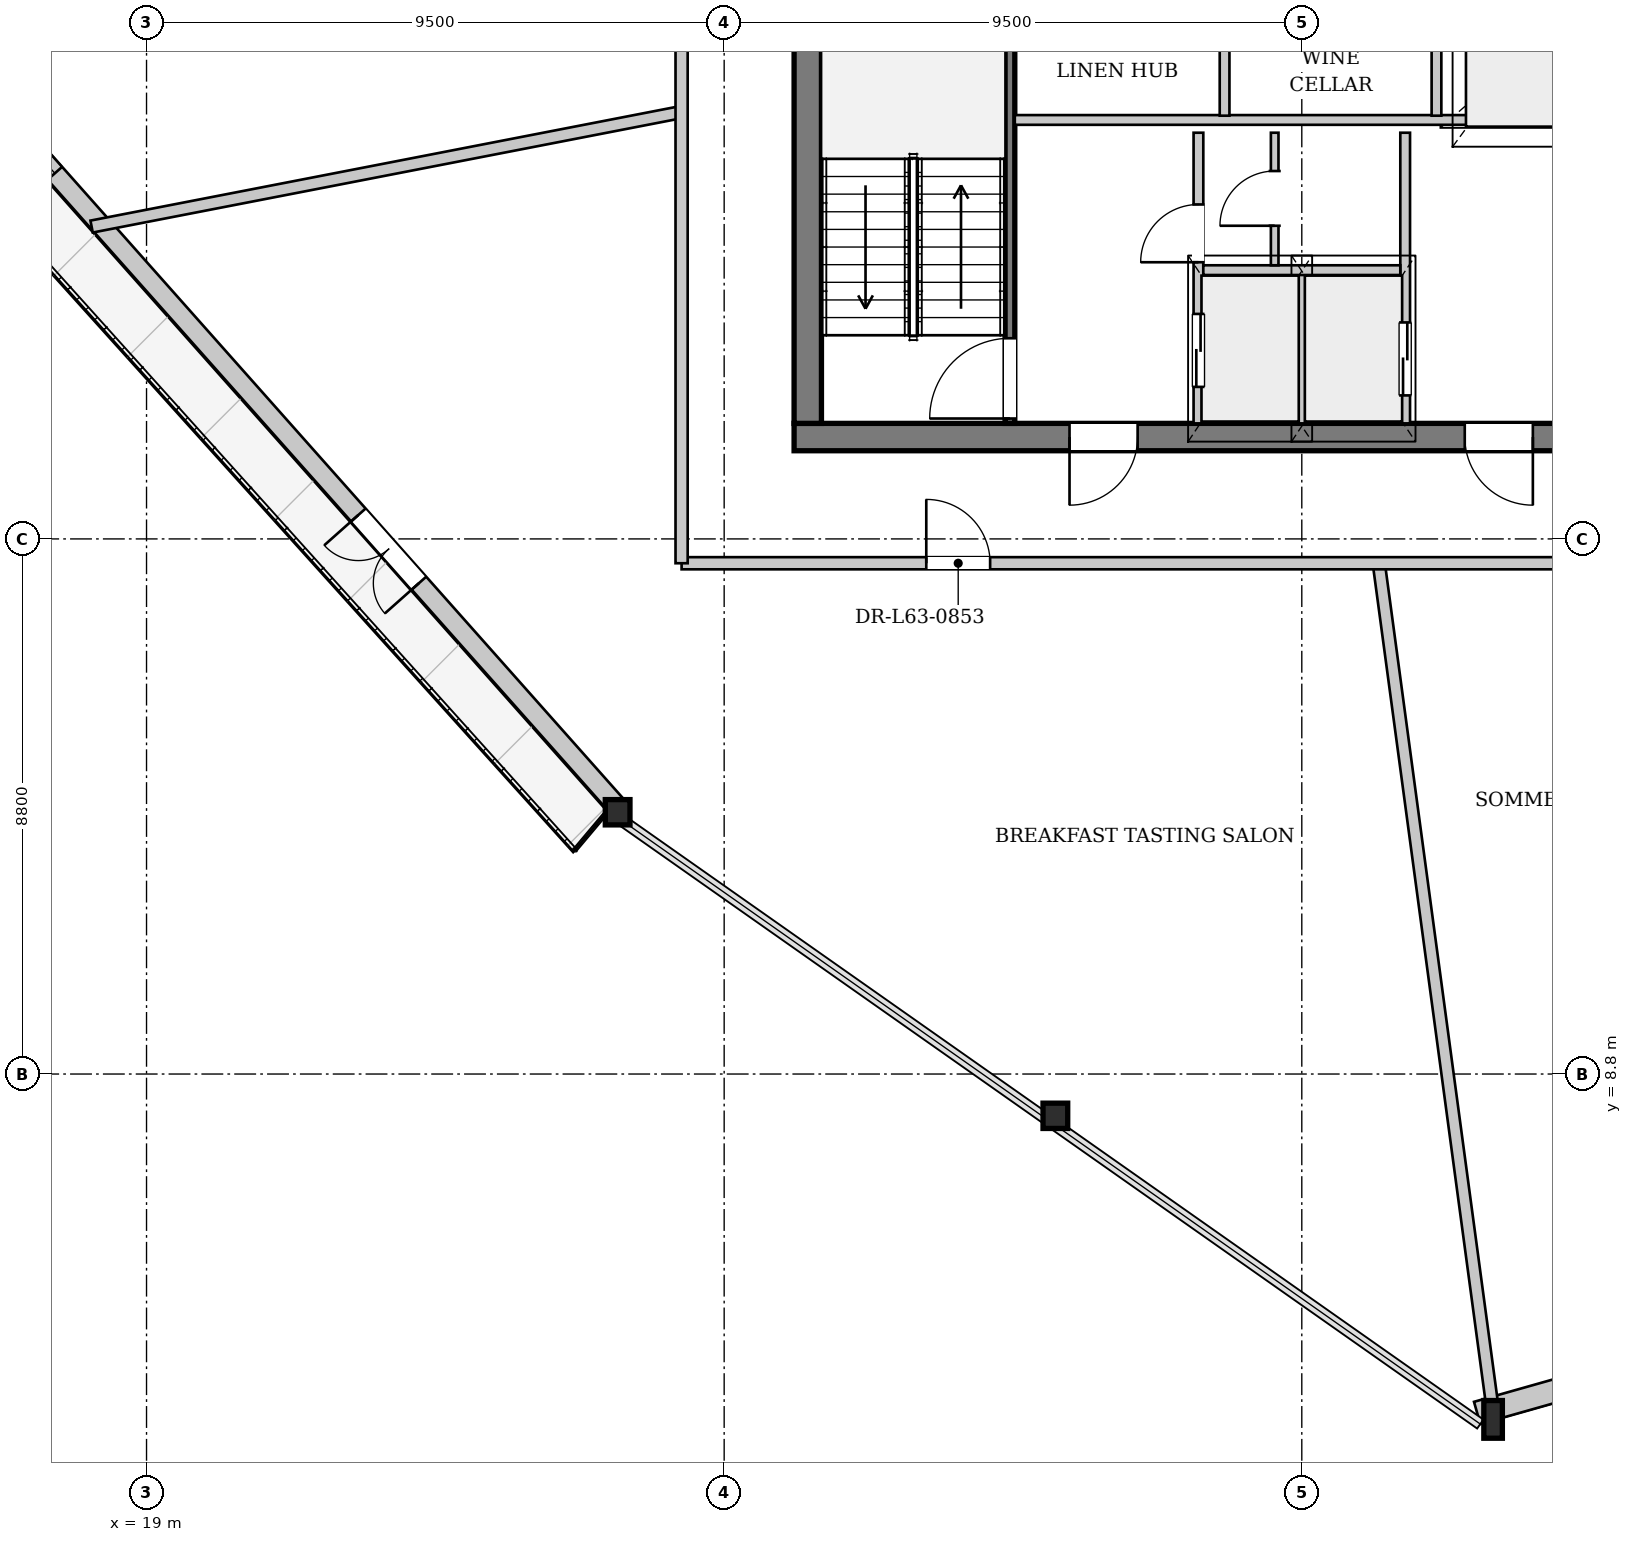
"""IFC4 building model, lengths in metres.
Left out: names, types, materials, properties, quantities, classifications, styles, units other than length and angle.
Written with IfcOpenShell. Run it as: python <this file> out.ifc"""

import sys

from ifc_helpers import new_model, si_unit, direction, frame, frame_2d, origin, origin_2d, place, context, subcontext, project, spatial, rectangle, i_section, extrude, source, transform, mapped, element, fill, save


model = new_model("IFC4")
c1 = context("Model", 3, precision=1e-05, world=origin(), true_north=direction((0.0, 1.0)))
c2 = subcontext(c1, "Body", "Model", "MODEL_VIEW")
j1 = project(units=[si_unit("LENGTHUNIT", "METRE"), si_unit("PLANEANGLEUNIT", "RADIAN")], contexts=[c1])
p1 = place(None, origin())
s1 = spatial("IfcSite", under=j1, at=p1, CompositionType="ELEMENT")
p2 = place(p1, origin())
s2 = spatial("IfcBuilding", under=s1, at=p2, CompositionType="ELEMENT")
p3 = place(p2, frame((0.0, 0.0, 238.1)))
s3 = spatial("IfcBuildingStorey", under=s2, at=p3, CompositionType="ELEMENT", Elevation=238.1)
m1 = source(origin(), c2, "Body", "SweptSolid", [
    extrude(i_section(OverallWidth=0.406, OverallDepth=0.416, WebThickness=0.027, FlangeThickness=0.042, at=origin_2d()), origin(), (0.0, 0.0, 1.0), 3.45),
])
p4 = place(p3, frame((26.589, 13.131, 0.0), z_axis=(0.091929151613, -0.015073833174, 0.995651450377), x_axis=(0.161811410383, 0.986821699939, 0.0)))
e1 = element("IfcColumn", 1, at=p4, inside=s3, PredefinedType="COLUMN", context=c2, shape_type="MappedRepresentation", body=[
    mapped(m1, transform((0.0, 0.0, 0.0), x_axis=(1.0, 0.0, 0.0), y_axis=(0.0, 1.0, 0.0), z_axis=(0.0, 0.0, 1.0), scale=1.0)),
])
m2 = source(origin(), c2, "Body", "SweptSolid", [
    extrude(i_section(OverallWidth=0.406, OverallDepth=0.416, WebThickness=0.027, FlangeThickness=0.042, at=origin_2d()), origin(), (0.0, 0.0, 1.0), 3.455),
])
p5 = place(p3, frame((33.762, 8.087, 0.0), z_axis=(0.106843472903, 0.014698043891, 0.994167209177), x_axis=(-0.136282644933, 0.990669995856, 0.0)))
e2 = element("IfcColumn", 2, at=p5, inside=s3, PredefinedType="COLUMN", context=c2, shape_type="MappedRepresentation", body=[
    mapped(m2, transform((0.0, 0.0, 0.0), x_axis=(1.0, 0.0, 0.0), y_axis=(0.0, 1.0, 0.0), z_axis=(0.0, 0.0, 1.0), scale=1.0)),
])
m3 = source(origin(), c2, "Body", "SweptSolid", [
    extrude(i_section(OverallWidth=0.305, OverallDepth=0.62, WebThickness=0.021, FlangeThickness=0.04, at=origin_2d()), origin(), (0.0, 0.0, 1.0), 3.464),
])
p6 = place(p3, frame((40.936, 3.044, 0.0), z_axis=(0.121578996156, 0.044332283236, 0.991591244595), x_axis=(-0.342573792128, 0.939490924356, 0.0)))
e3 = element("IfcColumn", 3, at=p6, inside=s3, PredefinedType="COLUMN", context=c2, shape_type="MappedRepresentation", body=[
    mapped(m3, transform((0.0, 0.0, 0.0), x_axis=(1.0, 0.0, 0.0), y_axis=(0.0, 1.0, 0.0), z_axis=(0.0, 0.0, 1.0), scale=1.0)),
])
p7 = place(p3, frame((44.15, 4.151, 0.0), z_axis=(0.0, 0.0, 1.0), x_axis=(-0.962229156425, -0.272240795117, 0.0)))
e4 = element("IfcWall", 4, at=p7, inside=s3, PredefinedType="SOLIDWALL", context=c2, shape_type="SweptSolid", body=[
    extrude(rectangle(XDim=3.394, YDim=0.38, at=frame_2d((1.697, 0.0))), origin(), (0.0, 0.0, 1.0), 2.872),
])
p8 = place(p3, frame((26.709, 13.237, 0.0), z_axis=(0.0, 0.0, 1.0), x_axis=(-0.664123592236, 0.74762280211, 0.0)))
e5 = element("IfcWall", 5, at=p8, inside=s3, PredefinedType="SOLIDWALL", context=c2, shape_type="SweptSolid", body=[
    extrude(rectangle(XDim=17.537, YDim=0.32, at=frame_2d((8.769, 0.0))), origin(), (0.0, 0.0, 1.0), 2.872),
])
p9 = place(p8, frame((4.862, 0.0, 0.0)))
e6 = element("IfcOpeningElement", 6, at=p9, cuts=e5, PredefinedType="OPENING", context=c2, shape_type="SweptSolid", body=[
    extrude(rectangle(XDim=1.5, YDim=2.3, at=frame_2d((0.75, 1.15))), frame((0.0, 0.17, 0.0), z_axis=(0.0, -1.0, 0.0), x_axis=(1.0, 0.0, 0.0)), (0.0, 0.0, 1.0), 0.34),
])
p10 = place(p8, frame((13.878, 0.0, 0.402)))
e7 = element("IfcOpeningElement", 7, at=p10, cuts=e5, PredefinedType="OPENING", context=c2, shape_type="SweptSolid", body=[
    extrude(rectangle(XDim=2.6, YDim=2.35, at=frame_2d((1.3, 1.175))), frame((0.0, 0.17, 0.0), z_axis=(0.0, -1.0, 0.0), x_axis=(1.0, 0.0, 0.0)), (0.0, 0.0, 1.0), 0.34),
])
p11 = place(p3, frame((46.35, 19.275, 0.0), z_axis=(0.0, 0.0, 1.0), x_axis=(-1.0, 0.0, 0.0)))
e8 = element("IfcWall", 8, at=p11, inside=s3, PredefinedType="SHEAR", context=c2, shape_type="SweptSolid", body=[
    extrude(rectangle(XDim=16.7, YDim=0.45, at=frame_2d((8.35, 0.0))), origin(), (0.0, 0.0, 1.0), 3.38),
])
p12 = place(p11, frame((4.55, 0.0, 0.0)))
e9 = element("IfcOpeningElement", 9, at=p12, cuts=e8, PredefinedType="OPENING", context=c2, shape_type="SweptSolid", body=[
    extrude(rectangle(XDim=1.12, YDim=2.25, at=frame_2d((0.56, 1.125))), frame((0.0, 0.235, 0.0), z_axis=(0.0, -1.0, 0.0), x_axis=(1.0, 0.0, 0.0)), (0.0, 0.0, 1.0), 0.47),
])
p13 = place(p11, frame((11.05, 0.0, 0.0)))
e10 = element("IfcOpeningElement", 10, at=p13, cuts=e8, PredefinedType="OPENING", context=c2, shape_type="SweptSolid", body=[
    extrude(rectangle(XDim=1.12, YDim=2.25, at=frame_2d((0.56, 1.125))), frame((0.0, 0.235, 0.0), z_axis=(0.0, -1.0, 0.0), x_axis=(1.0, 0.0, 0.0)), (0.0, 0.0, 1.0), 0.47),
])
p14 = place(p3, frame((29.875, 19.5, 0.0), z_axis=(0.0, 0.0, 1.0), x_axis=(0.0, 1.0, 0.0)))
e11 = element("IfcWall", 11, at=p14, inside=s3, PredefinedType="SHEAR", context=c2, shape_type="SweptSolid", body=[
    extrude(rectangle(XDim=14.2, YDim=0.45, at=frame_2d((7.1, 0.0))), origin(), (0.0, 0.0, 1.0), 3.38),
])
p15 = place(p14, frame((7.42, 0.0, 0.0)))
e12 = element("IfcOpeningElement", 12, at=p15, cuts=e11, PredefinedType="OPENING", context=c2, shape_type="SweptSolid", body=[
    extrude(rectangle(XDim=1.6, YDim=2.2, at=frame_2d((0.8, 1.1))), frame((0.0, 0.235, 0.0), z_axis=(0.0, -1.0, 0.0), x_axis=(1.0, 0.0, 0.0)), (0.0, 0.0, 1.0), 0.47),
])
p16 = place(p3, frame((33.2, 19.5, 0.0), z_axis=(0.0, 0.0, 1.0), x_axis=(0.0, 1.0, 0.0)))
e13 = element("IfcWall", 13, at=p16, inside=s3, PredefinedType="PARTITIONING", context=c2, shape_type="SweptSolid", body=[
    extrude(rectangle(XDim=7.46, YDim=0.16, at=frame_2d((3.73, 0.0))), origin(), (0.0, 0.0, 1.0), 3.38),
])
p17 = place(p16, frame((0.08, 0.0, 0.0)))
e14 = element("IfcOpeningElement", 14, at=p17, cuts=e13, PredefinedType="OPENING", context=c2, shape_type="SweptSolid", body=[
    extrude(rectangle(XDim=1.32, YDim=2.2, at=frame_2d((0.66, 1.1))), frame((0.0, 0.09, 0.0), z_axis=(0.0, -1.0, 0.0), x_axis=(1.0, 0.0, 0.0)), (0.0, 0.0, 1.0), 0.18),
])
p18 = place(p3, frame((36.3, 19.5, 0.0), z_axis=(0.0, 0.0, 1.0), x_axis=(0.0, 1.0, 0.0)))
e15 = element("IfcWall", 15, at=p18, inside=s3, PredefinedType="PARTITIONING", context=c2, shape_type="SweptSolid", body=[
    extrude(rectangle(XDim=4.78, YDim=0.16, at=frame_2d((2.39, 0.0))), origin(), (0.0, 0.0, 1.0), 3.38),
])
p19 = place(p18, frame((0.6, 0.0, 0.0)))
e16 = element("IfcOpeningElement", 16, at=p19, cuts=e15, PredefinedType="OPENING", context=c2, shape_type="SweptSolid", body=[
    extrude(rectangle(XDim=1.2, YDim=2.2, at=frame_2d((0.6, 1.1))), frame((0.0, 0.09, 0.0), z_axis=(0.0, -1.0, 0.0), x_axis=(1.0, 0.0, 0.0)), (0.0, 0.0, 1.0), 0.18),
])
p20 = place(p18, frame((2.65, 0.0, 0.0)))
e17 = element("IfcOpeningElement", 17, at=p20, cuts=e15, PredefinedType="OPENING", context=c2, shape_type="SweptSolid", body=[
    extrude(rectangle(XDim=0.95, YDim=2.1, at=frame_2d((0.475, 1.05))), frame((0.0, 0.09, 0.0), z_axis=(0.0, -1.0, 0.0), x_axis=(1.0, 0.0, 0.0)), (0.0, 0.0, 1.0), 0.18),
])
p21 = place(p3, frame((39.7, 24.28, 0.0), z_axis=(0.0, 0.0, 1.0), x_axis=(0.0, -1.0, 0.0)))
e18 = element("IfcWall", 18, at=p21, inside=s3, PredefinedType="PARTITIONING", context=c2, shape_type="SweptSolid", body=[
    extrude(rectangle(XDim=4.78, YDim=0.16, at=frame_2d((2.39, 0.0))), origin(), (0.0, 0.0, 1.0), 3.38),
])
p22 = place(p21, frame((3.12, 0.0, 0.0)))
e19 = element("IfcOpeningElement", 19, at=p22, cuts=e18, PredefinedType="OPENING", context=c2, shape_type="SweptSolid", body=[
    extrude(rectangle(XDim=1.2, YDim=2.2, at=frame_2d((0.6, 1.1))), frame((0.0, 0.09, 0.0), z_axis=(0.0, -1.0, 0.0), x_axis=(1.0, 0.0, 0.0)), (0.0, 0.0, 1.0), 0.18),
])
p23 = place(p3, frame((38.0, 19.5, 0.0), z_axis=(0.0, 0.0, 1.0), x_axis=(0.0, 1.0, 0.0)))
e20 = element("IfcWall", 20, at=p23, inside=s3, PredefinedType="PARTITIONING", context=c2, shape_type="SweptSolid", body=[
    extrude(rectangle(XDim=2.46, YDim=0.125, at=frame_2d((1.23, 0.0))), origin(), (0.0, 0.0, 1.0), 3.38),
])
p24 = place(p3, frame((36.38, 22.02, 0.0), z_axis=(0.0, 0.0, 1.0), x_axis=(1.0, 0.0, 0.0)))
e21 = element("IfcWall", 21, at=p24, inside=s3, PredefinedType="PARTITIONING", context=c2, shape_type="SweptSolid", body=[
    extrude(rectangle(XDim=3.24, YDim=0.16, at=frame_2d((1.62, 0.0))), origin(), (0.0, 0.0, 1.0), 3.38),
])
p25 = place(p3, frame((33.28, 24.49, 0.0), z_axis=(0.0, 0.0, 1.0), x_axis=(1.0, 0.0, 0.0)))
e22 = element("IfcWall", 22, at=p25, inside=s3, PredefinedType="PARTITIONING", context=c2, shape_type="SweptSolid", body=[
    extrude(rectangle(XDim=9.44, YDim=0.16, at=frame_2d((4.72, 0.0))), origin(), (0.0, 0.0, 1.0), 3.38),
])
p26 = place(p3, frame((37.554, 22.1, 0.0), z_axis=(0.0, 0.0, 1.0), x_axis=(0.0, 1.0, 0.0)))
e23 = element("IfcWall", 23, at=p26, inside=s3, PredefinedType="PARTITIONING", context=c2, shape_type="SweptSolid", body=[
    extrude(rectangle(XDim=2.18, YDim=0.125, at=frame_2d((1.09, 0.0))), origin(), (0.0, 0.0, 1.0), 3.38),
])
p27 = place(p26, frame((0.65, 0.0, 0.0)))
e24 = element("IfcOpeningElement", 24, at=p27, cuts=e23, PredefinedType="OPENING", context=c2, shape_type="SweptSolid", body=[
    extrude(rectangle(XDim=0.9, YDim=2.1, at=frame_2d((0.45, 1.05))), frame((0.0, 0.073, 0.0), z_axis=(0.0, -1.0, 0.0), x_axis=(1.0, 0.0, 0.0)), (0.0, 0.0, 1.0), 0.145),
])
for number, where, z_axis, x_axis in (
    (25, (36.73, 24.56, 0.0), (0.0, 0.0, 1.0), (0.0, 1.0, 0.0)),
    (26, (40.215, 24.56, 0.0), (0.0, 0.0, 1.0), (0.0, 1.0, 0.0)),
):
    element("IfcWall", number, at=place(p3, frame(where, z_axis=z_axis, x_axis=x_axis)), inside=s3, PredefinedType="PARTITIONING", context=c2, shape_type="SweptSolid", body=[
        extrude(rectangle(XDim=2.31, YDim=0.16, at=frame_2d((1.155, 0.0))), origin(), (0.0, 0.0, 1.0), 3.38),
    ])
p28 = place(p3, frame((27.8, 24.62, 0.0), z_axis=(0.0, 0.0, 1.0), x_axis=(-0.981681019312, -0.190531824958, 0.0)))
e27 = element("IfcWall", 27, at=p28, inside=s3, PredefinedType="PARTITIONING", context=c2, shape_type="SweptSolid", body=[
    extrude(rectangle(XDim=9.885, YDim=0.2, at=frame_2d((4.942, 0.0))), origin(), (0.0, 0.0, 1.0), 3.38),
])
p29 = place(p3, frame((39.266, 17.2, 0.0), z_axis=(0.0, 0.0, 1.0), x_axis=(0.133457513992, -0.99105453531, 0.0)))
e28 = element("IfcWall", 28, at=p29, inside=s3, PredefinedType="PARTITIONING", context=c2, shape_type="SweptSolid", body=[
    extrude(rectangle(XDim=14.188, YDim=0.2, at=frame_2d((7.094, 0.0))), origin(), (0.0, 0.0, 1.0), 3.38),
])
p30 = place(p3, frame((27.8, 17.2, 0.0), z_axis=(0.0, 0.0, 1.0), x_axis=(1.0, 0.0, 0.0)))
e29 = element("IfcWall", 29, at=p30, inside=s3, PredefinedType="PARTITIONING", context=c2, shape_type="SweptSolid", body=[
    extrude(rectangle(XDim=20.4, YDim=0.2, at=frame_2d((10.2, 0.0))), origin(), (0.0, 0.0, 1.0), 3.38),
])
p31 = place(p30, frame((4.024, 0.0, 0.0)))
e30 = element("IfcOpeningElement", 30, at=p31, cuts=e29, PredefinedType="OPENING", context=c2, shape_type="SweptSolid", body=[
    extrude(rectangle(XDim=1.05, YDim=2.2, at=frame_2d((0.525, 1.1))), frame((0.0, 0.11, 0.0), z_axis=(0.0, -1.0, 0.0), x_axis=(1.0, 0.0, 0.0)), (0.0, 0.0, 1.0), 0.22),
])
p32 = place(p3, frame((27.8, 17.2, 0.0), z_axis=(0.0, 0.0, 1.0), x_axis=(0.0, 1.0, 0.0)))
e31 = element("IfcWall", 31, at=p32, inside=s3, PredefinedType="PARTITIONING", context=c2, shape_type="SweptSolid", body=[
    extrude(rectangle(XDim=18.8, YDim=0.2, at=frame_2d((9.4, 0.0))), origin(), (0.0, 0.0, 1.0), 3.38),
])
m4 = source(origin(), c2, "Body", "SweptSolid", [
    extrude(rectangle(XDim=1.5, YDim=2.3, at=frame_2d((0.75, 1.15))), frame((0.0, 0.025, 0.0), z_axis=(0.0, -1.0, 0.0), x_axis=(1.0, 0.0, 0.0)), (0.0, 0.0, 1.0), 0.05),
])
p33 = place(p9, origin())
e32 = element("IfcDoor", 32, at=p33, inside=s3, OperationType="DOUBLE_DOOR_SINGLE_SWING", PredefinedType="DOOR", context=c2, shape_type="MappedRepresentation", body=[
    mapped(m4, transform((0.0, 0.0, 0.0), x_axis=(1.0, 0.0, 0.0), y_axis=(0.0, 1.0, 0.0), z_axis=(0.0, 0.0, 1.0), scale=1.0)),
])
fill(e6, e32)
m5 = source(origin(), c2, "Body", "SweptSolid", [
    extrude(rectangle(XDim=2.6, YDim=2.35, at=frame_2d((1.3, 1.175))), frame((0.0, 0.03, 0.0), z_axis=(0.0, -1.0, 0.0), x_axis=(1.0, 0.0, 0.0)), (0.0, 0.0, 1.0), 0.06),
])
p34 = place(p10, origin())
e33 = element("IfcWindow", 33, at=p34, inside=s3, PartitioningType="SINGLE_PANEL", PredefinedType="WINDOW", context=c2, shape_type="MappedRepresentation", body=[
    mapped(m5, transform((0.0, 0.0, 0.0), x_axis=(1.0, 0.0, 0.0), y_axis=(0.0, 1.0, 0.0), z_axis=(0.0, 0.0, 1.0), scale=1.0)),
])
fill(e7, e33)
m6 = source(origin(), c2, "Body", "SweptSolid", [
    extrude(rectangle(XDim=1.12, YDim=2.25, at=frame_2d((0.56, 1.125))), frame((0.0, 0.025, 0.0), z_axis=(0.0, -1.0, 0.0), x_axis=(1.0, 0.0, 0.0)), (0.0, 0.0, 1.0), 0.05),
])
p35 = place(p12, origin())
e34 = element("IfcDoor", 34, at=p35, inside=s3, OperationType="SINGLE_SWING_LEFT", PredefinedType="DOOR", context=c2, shape_type="MappedRepresentation", body=[
    mapped(m6, transform((0.0, 0.0, 0.0), x_axis=(1.0, 0.0, 0.0), y_axis=(0.0, 1.0, 0.0), z_axis=(0.0, 0.0, 1.0), scale=1.0)),
])
fill(e9, e34)
p36 = place(p13, origin())
e35 = element("IfcDoor", 35, at=p36, inside=s3, OperationType="SINGLE_SWING_RIGHT", PredefinedType="DOOR", context=c2, shape_type="MappedRepresentation", body=[
    mapped(m6, transform((0.0, 0.0, 0.0), x_axis=(1.0, 0.0, 0.0), y_axis=(0.0, 1.0, 0.0), z_axis=(0.0, 0.0, 1.0), scale=1.0)),
])
fill(e10, e35)
m7 = source(origin(), c2, "Body", "SweptSolid", [
    extrude(rectangle(XDim=1.32, YDim=2.2, at=frame_2d((0.66, 1.1))), frame((0.0, 0.025, 0.0), z_axis=(0.0, -1.0, 0.0), x_axis=(1.0, 0.0, 0.0)), (0.0, 0.0, 1.0), 0.05),
])
p37 = place(p17, origin())
e36 = element("IfcDoor", 36, at=p37, inside=s3, OperationType="SINGLE_SWING_LEFT", PredefinedType="DOOR", context=c2, shape_type="MappedRepresentation", body=[
    mapped(m7, transform((0.0, 0.0, 0.0), x_axis=(1.0, 0.0, 0.0), y_axis=(0.0, 1.0, 0.0), z_axis=(0.0, 0.0, 1.0), scale=1.0)),
])
fill(e14, e36)
m8 = source(origin(), c2, "Body", "SweptSolid", [
    extrude(rectangle(XDim=1.2, YDim=2.2, at=frame_2d((0.6, 1.1))), frame((0.0, 0.025, 0.0), z_axis=(0.0, -1.0, 0.0), x_axis=(1.0, 0.0, 0.0)), (0.0, 0.0, 1.0), 0.05),
])
p38 = place(p19, origin())
e37 = element("IfcDoor", 37, at=p38, inside=s3, OperationType="DOUBLE_DOOR_SLIDING", PredefinedType="DOOR", context=c2, shape_type="MappedRepresentation", body=[
    mapped(m8, transform((0.0, 0.0, 0.0), x_axis=(1.0, 0.0, 0.0), y_axis=(0.0, 1.0, 0.0), z_axis=(0.0, 0.0, 1.0), scale=1.0)),
])
fill(e16, e37)
m9 = source(origin(), c2, "Body", "SweptSolid", [
    extrude(rectangle(XDim=0.95, YDim=2.1, at=frame_2d((0.475, 1.05))), frame((0.0, 0.025, 0.0), z_axis=(0.0, -1.0, 0.0), x_axis=(1.0, 0.0, 0.0)), (0.0, 0.0, 1.0), 0.05),
])
p39 = place(p20, origin())
e38 = element("IfcDoor", 38, at=p39, inside=s3, OperationType="SINGLE_SWING_LEFT", PredefinedType="DOOR", context=c2, shape_type="MappedRepresentation", body=[
    mapped(m9, transform((0.0, 0.0, 0.0), x_axis=(1.0, 0.0, 0.0), y_axis=(0.0, 1.0, 0.0), z_axis=(0.0, 0.0, 1.0), scale=1.0)),
])
fill(e17, e38)
m10 = source(origin(), c2, "Body", "SweptSolid", [
    extrude(rectangle(XDim=0.9, YDim=2.1, at=frame_2d((0.45, 1.05))), frame((0.0, 0.025, 0.0), z_axis=(0.0, -1.0, 0.0), x_axis=(1.0, 0.0, 0.0)), (0.0, 0.0, 1.0), 0.05),
])
p40 = place(p27, origin())
e39 = element("IfcDoor", 39, at=p40, inside=s3, OperationType="SINGLE_SWING_LEFT", PredefinedType="DOOR", context=c2, shape_type="MappedRepresentation", body=[
    mapped(m10, transform((0.0, 0.0, 0.0), x_axis=(1.0, 0.0, 0.0), y_axis=(0.0, 1.0, 0.0), z_axis=(0.0, 0.0, 1.0), scale=1.0)),
])
fill(e24, e39)
p41 = place(p22, origin())
e40 = element("IfcDoor", 40, at=p41, inside=s3, OperationType="DOUBLE_DOOR_SLIDING", PredefinedType="DOOR", context=c2, shape_type="MappedRepresentation", body=[
    mapped(m8, transform((0.0, 0.0, 0.0), x_axis=(1.0, 0.0, 0.0), y_axis=(0.0, 1.0, 0.0), z_axis=(0.0, 0.0, 1.0), scale=1.0)),
])
fill(e19, e40)
m11 = source(origin(), c2, "Body", "SweptSolid", [
    extrude(rectangle(XDim=1.05, YDim=2.2, at=frame_2d((0.525, 1.1))), frame((0.0, 0.025, 0.0), z_axis=(0.0, -1.0, 0.0), x_axis=(1.0, 0.0, 0.0)), (0.0, 0.0, 1.0), 0.05),
])
p42 = place(p31, origin())
e41 = element("IfcDoor", 41, at=p42, inside=s3, OperationType="SINGLE_SWING_LEFT", PredefinedType="DOOR", context=c2, shape_type="MappedRepresentation", body=[
    mapped(m11, transform((0.0, 0.0, 0.0), x_axis=(1.0, 0.0, 0.0), y_axis=(0.0, 1.0, 0.0), z_axis=(0.0, 0.0, 1.0), scale=1.0)),
])
fill(e30, e41)
save(model, sys.argv[1])
